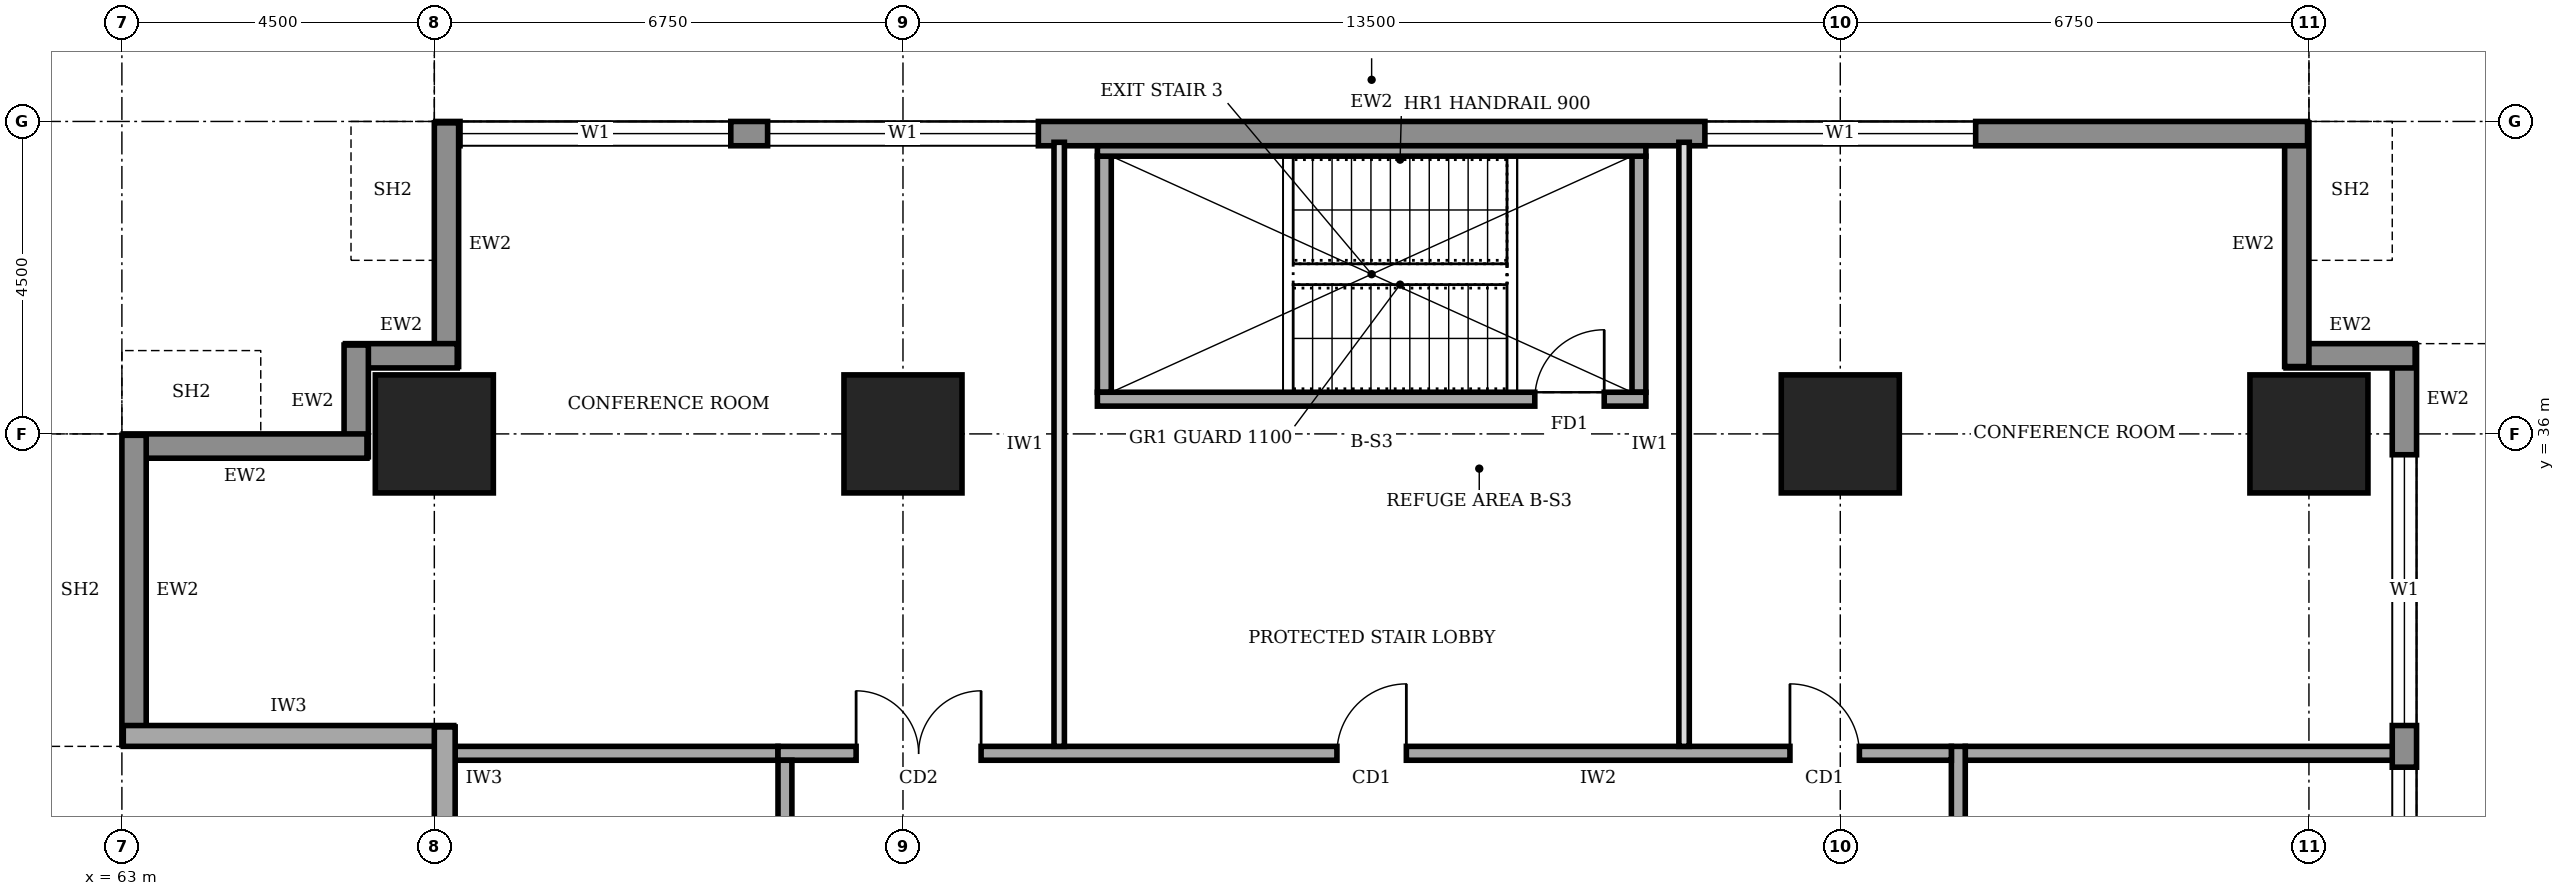
"""IFC4 building model, lengths in metres.
Left out: names, types, materials, properties, quantities, classifications, styles, units other than length and angle.
Written with IfcOpenShell. Run it as: python <this file> out.ifc"""

import sys

from ifc_helpers import new_model, si_unit, direction, frame, frame_2d, origin, origin_2d, place, context, subcontext, project, spatial, rectangle, extrude, element, fill, save


model = new_model("IFC4")
c1 = context("Model", 3, precision=1e-05, world=origin(), true_north=direction((0.0, 1.0)))
c2 = subcontext(c1, "Body", "Model", "MODEL_VIEW")
j1 = project(units=[si_unit("LENGTHUNIT", "METRE"), si_unit("PLANEANGLEUNIT", "RADIAN")], contexts=[c1])
p1 = place(None, origin())
s1 = spatial("IfcSite", under=j1, at=p1, CompositionType="ELEMENT")
p2 = place(p1, origin())
s2 = spatial("IfcBuilding", under=s1, at=p2, CompositionType="ELEMENT")
p3 = place(p2, frame((0.0, 0.0, 129.0)))
s3 = spatial("IfcBuildingStorey", under=s2, at=p3, CompositionType="ELEMENT", Elevation=129.0)
for number, where, z_axis, x_axis in (
    (1, (67.5, 36.0, 0.0), (0.0, 0.0, 1.0), (1.0, 0.0, 0.0)),
    (2, (74.25, 36.0, 0.0), (0.0, 0.0, 1.0), (1.0, 0.0, 0.0)),
    (3, (87.75, 36.0, 0.0), (0.0, 0.0, 1.0), (1.0, 0.0, 0.0)),
    (4, (94.5, 36.0, 0.0), (0.0, 0.0, 1.0), (1.0, 0.0, 0.0)),
):
    element("IfcColumn", number, at=place(p3, frame(where, z_axis=z_axis, x_axis=x_axis)), inside=s3, PredefinedType="COLUMN", context=c2, shape_type="SweptSolid", body=[
        extrude(rectangle(XDim=1.7, YDim=1.7, at=origin_2d()), origin(), (0.0, 0.0, 1.0), 4.0),
    ])
p4 = place(p3, frame((95.875, 3.32, 0.0), z_axis=(0.0, 0.0, 1.0), x_axis=(0.0, 1.0, 0.0)))
e5 = element("IfcWall", 5, at=p4, inside=s3, PredefinedType="STANDARD", context=c2, shape_type="SweptSolid", body=[
    extrude(rectangle(XDim=33.96, YDim=0.35, at=frame_2d((16.98, 0.0))), origin(), (0.0, 0.0, 1.0), 3.75),
])
p5 = place(p4, frame((1.48, 0.0, 0.9)))
e6 = element("IfcOpeningElement", 6, at=p5, cuts=e5, PredefinedType="OPENING", context=c2, shape_type="SweptSolid", body=[
    extrude(rectangle(XDim=3.9, YDim=2.2, at=frame_2d((1.95, 1.1))), frame((0.0, 0.185, 0.0), z_axis=(0.0, -1.0, 0.0), x_axis=(1.0, 0.0, 0.0)), (0.0, 0.0, 1.0), 0.37),
])
p6 = place(p4, frame((5.98, 0.0, 0.9)))
e7 = element("IfcOpeningElement", 7, at=p6, cuts=e5, PredefinedType="OPENING", context=c2, shape_type="SweptSolid", body=[
    extrude(rectangle(XDim=3.9, YDim=2.2, at=frame_2d((1.95, 1.1))), frame((0.0, 0.185, 0.0), z_axis=(0.0, -1.0, 0.0), x_axis=(1.0, 0.0, 0.0)), (0.0, 0.0, 1.0), 0.37),
])
p7 = place(p4, frame((10.48, 0.0, 0.9)))
e8 = element("IfcOpeningElement", 8, at=p7, cuts=e5, PredefinedType="OPENING", context=c2, shape_type="SweptSolid", body=[
    extrude(rectangle(XDim=3.9, YDim=2.2, at=frame_2d((1.95, 1.1))), frame((0.0, 0.185, 0.0), z_axis=(0.0, -1.0, 0.0), x_axis=(1.0, 0.0, 0.0)), (0.0, 0.0, 1.0), 0.37),
])
p8 = place(p4, frame((14.98, 0.0, 0.9)))
e9 = element("IfcOpeningElement", 9, at=p8, cuts=e5, PredefinedType="OPENING", context=c2, shape_type="SweptSolid", body=[
    extrude(rectangle(XDim=3.9, YDim=2.2, at=frame_2d((1.95, 1.1))), frame((0.0, 0.185, 0.0), z_axis=(0.0, -1.0, 0.0), x_axis=(1.0, 0.0, 0.0)), (0.0, 0.0, 1.0), 0.37),
])
p9 = place(p4, frame((19.48, 0.0, 0.9)))
e10 = element("IfcOpeningElement", 10, at=p9, cuts=e5, PredefinedType="OPENING", context=c2, shape_type="SweptSolid", body=[
    extrude(rectangle(XDim=3.9, YDim=2.2, at=frame_2d((1.95, 1.1))), frame((0.0, 0.185, 0.0), z_axis=(0.0, -1.0, 0.0), x_axis=(1.0, 0.0, 0.0)), (0.0, 0.0, 1.0), 0.37),
])
p10 = place(p4, frame((23.98, 0.0, 0.9)))
e11 = element("IfcOpeningElement", 11, at=p10, cuts=e5, PredefinedType="OPENING", context=c2, shape_type="SweptSolid", body=[
    extrude(rectangle(XDim=3.9, YDim=2.2, at=frame_2d((1.95, 1.1))), frame((0.0, 0.185, 0.0), z_axis=(0.0, -1.0, 0.0), x_axis=(1.0, 0.0, 0.0)), (0.0, 0.0, 1.0), 0.37),
])
p11 = place(p4, frame((28.48, 0.0, 0.9)))
e12 = element("IfcOpeningElement", 12, at=p11, cuts=e5, PredefinedType="OPENING", context=c2, shape_type="SweptSolid", body=[
    extrude(rectangle(XDim=3.9, YDim=2.2, at=frame_2d((1.95, 1.1))), frame((0.0, 0.185, 0.0), z_axis=(0.0, -1.0, 0.0), x_axis=(1.0, 0.0, 0.0)), (0.0, 0.0, 1.0), 0.37),
])
p12 = place(p3, frame((96.03, 37.125, 0.0), z_axis=(0.0, 0.0, 1.0), x_axis=(-1.0, 0.0, 0.0)))
e13 = element("IfcWall", 13, at=p12, inside=s3, PredefinedType="STANDARD", context=c2, shape_type="SweptSolid", body=[
    extrude(rectangle(XDim=1.86, YDim=0.35, at=frame_2d((0.93, 0.0))), origin(), (0.0, 0.0, 1.0), 3.75),
])
p13 = place(p3, frame((94.325, 36.97, 0.0), z_axis=(0.0, 0.0, 1.0), x_axis=(0.0, 1.0, 0.0)))
e14 = element("IfcWall", 14, at=p13, inside=s3, PredefinedType="STANDARD", context=c2, shape_type="SweptSolid", body=[
    extrude(rectangle(XDim=3.51, YDim=0.35, at=frame_2d((1.755, 0.0))), origin(), (0.0, 0.0, 1.0), 2.85),
])
p14 = place(p3, frame((94.48, 40.325, 0.0), z_axis=(0.0, 0.0, 1.0), x_axis=(-1.0, 0.0, 0.0)))
e15 = element("IfcWall", 15, at=p14, inside=s3, PredefinedType="STANDARD", context=c2, shape_type="SweptSolid", body=[
    extrude(rectangle(XDim=26.96, YDim=0.35, at=frame_2d((13.48, 0.0))), origin(), (0.0, 0.0, 1.0), 3.75),
])
p15 = place(p14, frame((22.71, 0.0, 0.9)))
e16 = element("IfcOpeningElement", 16, at=p15, cuts=e15, PredefinedType="OPENING", context=c2, shape_type="SweptSolid", body=[
    extrude(rectangle(XDim=3.9, YDim=2.2, at=frame_2d((1.95, 1.1))), frame((0.0, 0.185, 0.0), z_axis=(0.0, -1.0, 0.0), x_axis=(1.0, 0.0, 0.0)), (0.0, 0.0, 1.0), 0.37),
])
p16 = place(p14, frame((18.28, 0.0, 0.9)))
e17 = element("IfcOpeningElement", 17, at=p16, cuts=e15, PredefinedType="OPENING", context=c2, shape_type="SweptSolid", body=[
    extrude(rectangle(XDim=3.9, YDim=2.2, at=frame_2d((1.95, 1.1))), frame((0.0, 0.185, 0.0), z_axis=(0.0, -1.0, 0.0), x_axis=(1.0, 0.0, 0.0)), (0.0, 0.0, 1.0), 0.37),
])
p17 = place(p14, frame((4.78, 0.0, 0.9)))
e18 = element("IfcOpeningElement", 18, at=p17, cuts=e15, PredefinedType="OPENING", context=c2, shape_type="SweptSolid", body=[
    extrude(rectangle(XDim=3.9, YDim=2.2, at=frame_2d((1.95, 1.1))), frame((0.0, 0.185, 0.0), z_axis=(0.0, -1.0, 0.0), x_axis=(1.0, 0.0, 0.0)), (0.0, 0.0, 1.0), 0.37),
])
p18 = place(p3, frame((67.675, 40.48, 0.0), z_axis=(0.0, 0.0, 1.0), x_axis=(0.0, -1.0, 0.0)))
e19 = element("IfcWall", 19, at=p18, inside=s3, PredefinedType="STANDARD", context=c2, shape_type="SweptSolid", body=[
    extrude(rectangle(XDim=3.51, YDim=0.35, at=frame_2d((1.755, 0.0))), origin(), (0.0, 0.0, 1.0), 2.85),
])
for number, where, z_axis, x_axis in (
    (20, (67.83, 37.125, 0.0), (0.0, 0.0, 1.0), (-1.0, 0.0, 0.0)),
    (21, (66.375, 37.28, 0.0), (0.0, 0.0, 1.0), (0.0, -1.0, 0.0)),
):
    element("IfcWall", number, at=place(p3, frame(where, z_axis=z_axis, x_axis=x_axis)), inside=s3, PredefinedType="STANDARD", context=c2, shape_type="SweptSolid", body=[
        extrude(rectangle(XDim=1.61, YDim=0.35, at=frame_2d((0.805, 0.0))), origin(), (0.0, 0.0, 1.0), 3.75),
    ])
p19 = place(p3, frame((66.53, 35.825, 0.0), z_axis=(0.0, 0.0, 1.0), x_axis=(-1.0, 0.0, 0.0)))
e22 = element("IfcWall", 22, at=p19, inside=s3, PredefinedType="STANDARD", context=c2, shape_type="SweptSolid", body=[
    extrude(rectangle(XDim=3.51, YDim=0.35, at=frame_2d((1.755, 0.0))), origin(), (0.0, 0.0, 1.0), 2.85),
])
p20 = place(p3, frame((63.175, 35.98, 0.0), z_axis=(0.0, 0.0, 1.0), x_axis=(0.0, -1.0, 0.0)))
e23 = element("IfcWall", 23, at=p20, inside=s3, PredefinedType="STANDARD", context=c2, shape_type="SweptSolid", body=[
    extrude(rectangle(XDim=4.46, YDim=0.35, at=frame_2d((2.23, 0.0))), origin(), (0.0, 0.0, 1.0), 3.75),
])
p21 = place(p3, frame((63.02, 31.65, 0.0), z_axis=(0.0, 0.0, 1.0), x_axis=(1.0, 0.0, 0.0)))
e24 = element("IfcWall", 24, at=p21, inside=s3, PredefinedType="SOLIDWALL", context=c2, shape_type="SweptSolid", body=[
    extrude(rectangle(XDim=4.76, YDim=0.3, at=frame_2d((2.38, 0.0))), origin(), (0.0, 0.0, 1.0), 3.75),
])
p22 = place(p3, frame((67.65, 31.78, 0.0), z_axis=(0.0, 0.0, 1.0), x_axis=(0.0, -1.0, 0.0)))
e25 = element("IfcWall", 25, at=p22, inside=s3, PredefinedType="SOLIDWALL", context=c2, shape_type="SweptSolid", body=[
    extrude(rectangle(XDim=1.48, YDim=0.3, at=frame_2d((0.74, 0.0))), origin(), (0.0, 0.0, 1.0), 2.65),
])
p23 = place(p3, frame((89.45, 9.2, 0.0), z_axis=(0.0, 0.0, 1.0), x_axis=(0.0, 1.0, 0.0)))
e26 = element("IfcWall", 26, at=p23, inside=s3, PredefinedType="SOLIDWALL", context=c2, shape_type="SweptSolid", body=[
    extrude(rectangle(XDim=22.3, YDim=0.2, at=frame_2d((11.15, 0.0))), origin(), (0.0, 0.0, 1.0), 3.75),
])
p24 = place(p23, frame((1.625, 0.0, 0.0)))
e27 = element("IfcOpeningElement", 27, at=p24, cuts=e26, PredefinedType="OPENING", context=c2, shape_type="SweptSolid", body=[
    extrude(rectangle(XDim=1.0, YDim=2.1, at=frame_2d((0.5, 1.05))), frame((0.0, 0.11, 0.0), z_axis=(0.0, -1.0, 0.0), x_axis=(1.0, 0.0, 0.0)), (0.0, 0.0, 1.0), 0.22),
])
p25 = place(p23, frame((5.825, 0.0, 0.0)))
e28 = element("IfcOpeningElement", 28, at=p25, cuts=e26, PredefinedType="OPENING", context=c2, shape_type="SweptSolid", body=[
    extrude(rectangle(XDim=0.9, YDim=2.1, at=frame_2d((0.45, 1.05))), frame((0.0, 0.11, 0.0), z_axis=(0.0, -1.0, 0.0), x_axis=(1.0, 0.0, 0.0)), (0.0, 0.0, 1.0), 0.22),
])
p26 = place(p23, frame((8.75, 0.0, 0.0)))
e29 = element("IfcOpeningElement", 29, at=p26, cuts=e26, PredefinedType="OPENING", context=c2, shape_type="SweptSolid", body=[
    extrude(rectangle(XDim=0.9, YDim=2.1, at=frame_2d((0.45, 1.05))), frame((0.0, 0.11, 0.0), z_axis=(0.0, -1.0, 0.0), x_axis=(1.0, 0.0, 0.0)), (0.0, 0.0, 1.0), 0.22),
])
p27 = place(p23, frame((13.525, 0.0, 0.0)))
e30 = element("IfcOpeningElement", 30, at=p27, cuts=e26, PredefinedType="OPENING", context=c2, shape_type="SweptSolid", body=[
    extrude(rectangle(XDim=0.9, YDim=2.1, at=frame_2d((0.45, 1.05))), frame((0.0, 0.11, 0.0), z_axis=(0.0, -1.0, 0.0), x_axis=(1.0, 0.0, 0.0)), (0.0, 0.0, 1.0), 0.22),
])
p28 = place(p23, frame((16.15, 0.0, 0.0)))
e31 = element("IfcOpeningElement", 31, at=p28, cuts=e26, PredefinedType="OPENING", context=c2, shape_type="SweptSolid", body=[
    extrude(rectangle(XDim=1.0, YDim=2.1, at=frame_2d((0.5, 1.05))), frame((0.0, 0.11, 0.0), z_axis=(0.0, -1.0, 0.0), x_axis=(1.0, 0.0, 0.0)), (0.0, 0.0, 1.0), 0.22),
])
p29 = place(p23, frame((10.8, 0.0, 0.0)))
e32 = element("IfcOpeningElement", 32, at=p29, cuts=e26, PredefinedType="OPENING", context=c2, shape_type="SweptSolid", body=[
    extrude(rectangle(XDim=1.0, YDim=2.1, at=frame_2d((0.5, 1.05))), frame((0.0, 0.11, 0.0), z_axis=(0.0, -1.0, 0.0), x_axis=(1.0, 0.0, 0.0)), (0.0, 0.0, 1.0), 0.22),
])
p30 = place(p23, frame((19.475, 0.0, 0.0)))
e33 = element("IfcOpeningElement", 33, at=p30, cuts=e26, PredefinedType="OPENING", context=c2, shape_type="SweptSolid", body=[
    extrude(rectangle(XDim=1.0, YDim=2.1, at=frame_2d((0.5, 1.05))), frame((0.0, 0.11, 0.0), z_axis=(0.0, -1.0, 0.0), x_axis=(1.0, 0.0, 0.0)), (0.0, 0.0, 1.0), 0.22),
])
p31 = place(p3, frame((89.35, 31.4, 0.0), z_axis=(0.0, 0.0, 1.0), x_axis=(-1.0, 0.0, 0.0)))
e34 = element("IfcWall", 34, at=p31, inside=s3, PredefinedType="SOLIDWALL", context=c2, shape_type="SweptSolid", body=[
    extrude(rectangle(XDim=16.9, YDim=0.2, at=frame_2d((8.45, 0.0))), origin(), (0.0, 0.0, 1.0), 3.75),
])
p32 = place(p31, frame((13.975, 0.0, 0.0)))
e35 = element("IfcOpeningElement", 35, at=p32, cuts=e34, PredefinedType="OPENING", context=c2, shape_type="SweptSolid", body=[
    extrude(rectangle(XDim=1.8, YDim=2.1, at=frame_2d((0.9, 1.05))), frame((0.0, 0.11, 0.0), z_axis=(0.0, -1.0, 0.0), x_axis=(1.0, 0.0, 0.0)), (0.0, 0.0, 1.0), 0.22),
])
p33 = place(p31, frame((7.85, 0.0, 0.0)))
e36 = element("IfcOpeningElement", 36, at=p33, cuts=e34, PredefinedType="OPENING", context=c2, shape_type="SweptSolid", body=[
    extrude(rectangle(XDim=1.0, YDim=2.1, at=frame_2d((0.5, 1.05))), frame((0.0, 0.11, 0.0), z_axis=(0.0, -1.0, 0.0), x_axis=(1.0, 0.0, 0.0)), (0.0, 0.0, 1.0), 0.22),
])
p34 = place(p31, frame((1.325, 0.0, 0.0)))
e37 = element("IfcOpeningElement", 37, at=p34, cuts=e34, PredefinedType="OPENING", context=c2, shape_type="SweptSolid", body=[
    extrude(rectangle(XDim=1.0, YDim=2.1, at=frame_2d((0.5, 1.05))), frame((0.0, 0.11, 0.0), z_axis=(0.0, -1.0, 0.0), x_axis=(1.0, 0.0, 0.0)), (0.0, 0.0, 1.0), 0.22),
])
p35 = place(p3, frame((72.55, 31.3, 0.0), z_axis=(0.0, 0.0, 1.0), x_axis=(0.0, -1.0, 0.0)))
e38 = element("IfcWall", 38, at=p35, inside=s3, PredefinedType="SOLIDWALL", context=c2, shape_type="SweptSolid", body=[
    extrude(rectangle(XDim=22.3, YDim=0.2, at=frame_2d((11.15, 0.0))), origin(), (0.0, 0.0, 1.0), 3.75),
])
p36 = place(p35, frame((10.15, 0.0, 0.0)))
e39 = element("IfcOpeningElement", 39, at=p36, cuts=e38, PredefinedType="OPENING", context=c2, shape_type="SweptSolid", body=[
    extrude(rectangle(XDim=1.8, YDim=2.1, at=frame_2d((0.9, 1.05))), frame((0.0, 0.11, 0.0), z_axis=(0.0, -1.0, 0.0), x_axis=(1.0, 0.0, 0.0)), (0.0, 0.0, 1.0), 0.22),
])
p37 = place(p3, frame((67.8, 31.4, 0.0), z_axis=(0.0, 0.0, 1.0), x_axis=(1.0, 0.0, 0.0)))
e40 = element("IfcWall", 40, at=p37, inside=s3, PredefinedType="SOLIDWALL", context=c2, shape_type="SweptSolid", body=[
    extrude(rectangle(XDim=4.65, YDim=0.2, at=frame_2d((2.325, 0.0))), origin(), (0.0, 0.0, 1.0), 3.75),
])
p38 = place(p3, frame((89.55, 31.4, 0.0), z_axis=(0.0, 0.0, 1.0), x_axis=(1.0, 0.0, 0.0)))
e41 = element("IfcWall", 41, at=p38, inside=s3, PredefinedType="SOLIDWALL", context=c2, shape_type="SweptSolid", body=[
    extrude(rectangle(XDim=6.2, YDim=0.2, at=frame_2d((3.1, 0.0))), origin(), (0.0, 0.0, 1.0), 3.75),
])
for number, where, z_axis, x_axis in (
    (42, (76.5, 31.5, 0.0), (0.0, 0.0, 1.0), (0.0, 1.0, 0.0)),
    (43, (85.5, 31.5, 0.0), (0.0, 0.0, 1.0), (0.0, 1.0, 0.0)),
):
    element("IfcWall", number, at=place(p3, frame(where, z_axis=z_axis, x_axis=x_axis)), inside=s3, PredefinedType="PARTITIONING", context=c2, shape_type="SweptSolid", body=[
        extrude(rectangle(XDim=8.7, YDim=0.15, at=frame_2d((4.35, 0.0))), origin(), (0.0, 0.0, 1.0), 3.75),
    ])
p39 = place(p3, frame((77.05, 36.5, 0.0), z_axis=(0.0, 0.0, 1.0), x_axis=(1.0, 0.0, 0.0)))
e44 = element("IfcWall", 44, at=p39, inside=s3, PredefinedType="SOLIDWALL", context=c2, shape_type="SweptSolid", body=[
    extrude(rectangle(XDim=7.9, YDim=0.2, at=frame_2d((3.95, 0.0))), origin(), (0.0, 0.0, 1.0), 3.75),
])
p40 = place(p39, frame((6.3, 0.0, 0.0)))
e45 = element("IfcOpeningElement", 45, at=p40, cuts=e44, PredefinedType="OPENING", context=c2, shape_type="SweptSolid", body=[
    extrude(rectangle(XDim=1.0, YDim=2.1, at=frame_2d((0.5, 1.05))), frame((0.0, 0.11, 0.0), z_axis=(0.0, -1.0, 0.0), x_axis=(1.0, 0.0, 0.0)), (0.0, 0.0, 1.0), 0.22),
])
p41 = place(p3, frame((77.05, 40.075, 0.0), z_axis=(0.0, 0.0, 1.0), x_axis=(1.0, 0.0, 0.0)))
e46 = element("IfcWall", 46, at=p41, inside=s3, PredefinedType="SOLIDWALL", context=c2, shape_type="SweptSolid", body=[
    extrude(rectangle(XDim=7.9, YDim=0.15, at=frame_2d((3.95, 0.0))), origin(), (0.0, 0.0, 1.0), 3.75),
])
for number, where, z_axis, x_axis in (
    (47, (77.15, 36.6, 0.0), (0.0, 0.0, 1.0), (0.0, 1.0, 0.0)),
    (48, (84.85, 36.6, 0.0), (0.0, 0.0, 1.0), (0.0, 1.0, 0.0)),
):
    element("IfcWall", number, at=place(p3, frame(where, z_axis=z_axis, x_axis=x_axis)), inside=s3, PredefinedType="SOLIDWALL", context=c2, shape_type="SweptSolid", body=[
        extrude(rectangle(XDim=3.4, YDim=0.2, at=frame_2d((1.7, 0.0))), origin(), (0.0, 0.0, 1.0), 3.75),
    ])
p42 = place(p10, origin())
e49 = element("IfcWindow", 49, at=p42, inside=s3, PartitioningType="SINGLE_PANEL", PredefinedType="WINDOW", context=c2, shape_type="SweptSolid", body=[
    extrude(rectangle(XDim=3.9, YDim=2.2, at=frame_2d((1.95, 1.1))), frame((0.0, 0.03, 0.0), z_axis=(0.0, -1.0, 0.0), x_axis=(1.0, 0.0, 0.0)), (0.0, 0.0, 1.0), 0.06),
])
fill(e11, e49)
p43 = place(p11, origin())
e50 = element("IfcWindow", 50, at=p43, inside=s3, PartitioningType="SINGLE_PANEL", PredefinedType="WINDOW", context=c2, shape_type="SweptSolid", body=[
    extrude(rectangle(XDim=3.9, YDim=2.2, at=frame_2d((1.95, 1.1))), frame((0.0, 0.03, 0.0), z_axis=(0.0, -1.0, 0.0), x_axis=(1.0, 0.0, 0.0)), (0.0, 0.0, 1.0), 0.06),
])
fill(e12, e50)
p44 = place(p15, origin())
e51 = element("IfcWindow", 51, at=p44, inside=s3, PartitioningType="SINGLE_PANEL", PredefinedType="WINDOW", context=c2, shape_type="SweptSolid", body=[
    extrude(rectangle(XDim=3.9, YDim=2.2, at=frame_2d((1.95, 1.1))), frame((0.0, 0.03, 0.0), z_axis=(0.0, -1.0, 0.0), x_axis=(1.0, 0.0, 0.0)), (0.0, 0.0, 1.0), 0.06),
])
fill(e16, e51)
p45 = place(p16, origin())
e52 = element("IfcWindow", 52, at=p45, inside=s3, PartitioningType="SINGLE_PANEL", PredefinedType="WINDOW", context=c2, shape_type="SweptSolid", body=[
    extrude(rectangle(XDim=3.9, YDim=2.2, at=frame_2d((1.95, 1.1))), frame((0.0, 0.03, 0.0), z_axis=(0.0, -1.0, 0.0), x_axis=(1.0, 0.0, 0.0)), (0.0, 0.0, 1.0), 0.06),
])
fill(e17, e52)
p46 = place(p17, origin())
e53 = element("IfcWindow", 53, at=p46, inside=s3, PartitioningType="SINGLE_PANEL", PredefinedType="WINDOW", context=c2, shape_type="SweptSolid", body=[
    extrude(rectangle(XDim=3.9, YDim=2.2, at=frame_2d((1.95, 1.1))), frame((0.0, 0.03, 0.0), z_axis=(0.0, -1.0, 0.0), x_axis=(1.0, 0.0, 0.0)), (0.0, 0.0, 1.0), 0.06),
])
fill(e18, e53)
p47 = place(p32, frame((1.8, 0.0, 0.0), z_axis=(0.0, 0.0, 1.0), x_axis=(-1.0, 0.0, 0.0)))
e54 = element("IfcDoor", 54, at=p47, inside=s3, OperationType="DOUBLE_DOOR_SINGLE_SWING", PredefinedType="DOOR", context=c2, shape_type="SweptSolid", body=[
    extrude(rectangle(XDim=1.8, YDim=2.1, at=frame_2d((0.9, 1.05))), frame((0.0, 0.025, 0.0), z_axis=(0.0, -1.0, 0.0), x_axis=(1.0, 0.0, 0.0)), (0.0, 0.0, 1.0), 0.05),
])
fill(e35, e54)
p48 = place(p33, frame((1.0, 0.0, 0.0), z_axis=(0.0, 0.0, 1.0), x_axis=(-1.0, 0.0, 0.0)))
e55 = element("IfcDoor", 55, at=p48, inside=s3, OperationType="SINGLE_SWING_RIGHT", PredefinedType="DOOR", context=c2, shape_type="SweptSolid", body=[
    extrude(rectangle(XDim=1.0, YDim=2.1, at=frame_2d((0.5, 1.05))), frame((0.0, 0.025, 0.0), z_axis=(0.0, -1.0, 0.0), x_axis=(1.0, 0.0, 0.0)), (0.0, 0.0, 1.0), 0.05),
])
fill(e36, e55)
p49 = place(p34, frame((1.0, 0.0, 0.0), z_axis=(0.0, 0.0, 1.0), x_axis=(-1.0, 0.0, 0.0)))
e56 = element("IfcDoor", 56, at=p49, inside=s3, OperationType="SINGLE_SWING_LEFT", PredefinedType="DOOR", context=c2, shape_type="SweptSolid", body=[
    extrude(rectangle(XDim=1.0, YDim=2.1, at=frame_2d((0.5, 1.05))), frame((0.0, 0.025, 0.0), z_axis=(0.0, -1.0, 0.0), x_axis=(1.0, 0.0, 0.0)), (0.0, 0.0, 1.0), 0.05),
])
fill(e37, e56)
p50 = place(p40, origin())
e57 = element("IfcDoor", 57, at=p50, inside=s3, OperationType="SINGLE_SWING_RIGHT", PredefinedType="DOOR", context=c2, shape_type="SweptSolid", body=[
    extrude(rectangle(XDim=1.0, YDim=2.1, at=frame_2d((0.5, 1.05))), frame((0.0, 0.025, 0.0), z_axis=(0.0, -1.0, 0.0), x_axis=(1.0, 0.0, 0.0)), (0.0, 0.0, 1.0), 0.05),
])
fill(e45, e57)
save(model, sys.argv[1])
